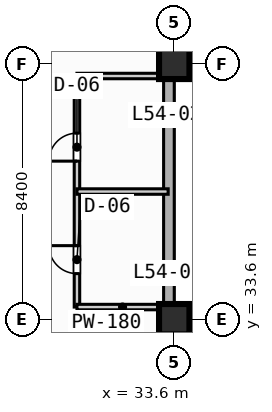
"""IFC4 building model, lengths in metres.
Left out: names, types, materials, properties, quantities, classifications, styles, units other than length and angle.
Written with IfcOpenShell. Run it as: python <this file> out.ifc"""

import sys

from ifc_helpers import new_model, si_unit, direction, frame, frame_2d, origin, origin_2d, place, context, subcontext, project, spatial, rectangle, extrude, element, fill, save


model = new_model("IFC4")
c1 = context("Model", 3, precision=1e-05, world=origin(), true_north=direction((0.0, 1.0)))
c2 = subcontext(c1, "Body", "Model", "MODEL_VIEW")
j1 = project(units=[si_unit("LENGTHUNIT", "METRE"), si_unit("PLANEANGLEUNIT", "RADIAN")], contexts=[c1])
p1 = place(None, origin())
s1 = spatial("IfcSite", under=j1, at=p1, CompositionType="ELEMENT")
p2 = place(p1, origin())
s2 = spatial("IfcBuilding", under=s1, at=p2, CompositionType="ELEMENT")
p3 = place(p2, frame((0.0, 0.0, 219.8)))
s3 = spatial("IfcBuildingStorey", under=s2, at=p3, CompositionType="ELEMENT", Elevation=219.8)
for number, where, z_axis, x_axis in (
    (1, (33.6, 33.6, 0.0), (0.0, 0.0, 1.0), (1.0, 0.0, 0.0)),
    (2, (33.6, 42.0, 0.0), (0.0, 0.0, 1.0), (1.0, 0.0, 0.0)),
):
    element("IfcColumn", number, at=place(p3, frame(where, z_axis=z_axis, x_axis=x_axis)), inside=s3, PredefinedType="COLUMN", context=c2, shape_type="SweptSolid", body=[
        extrude(rectangle(XDim=1.0, YDim=1.0, at=origin_2d()), origin(), (0.0, 0.0, 1.0), 4.2),
    ])
p4 = place(p3, frame((33.425, 72.425, 0.0), z_axis=(0.0, 0.0, 1.0), x_axis=(0.0, -1.0, 0.0)))
e3 = element("IfcWall", 3, at=p4, inside=s3, PredefinedType="STANDARD", context=c2, shape_type="SweptSolid", body=[
    extrude(rectangle(XDim=39.0, YDim=0.35, at=frame_2d((19.5, 0.0))), origin(), (0.0, 0.0, 1.0), 3.97),
])
p5 = place(p3, frame((33.425, 33.425, 0.0), z_axis=(0.0, 0.0, 1.0), x_axis=(1.0, 0.0, 0.0)))
e4 = element("IfcWall", 4, at=p5, inside=s3, PredefinedType="STANDARD", context=c2, shape_type="SweptSolid", body=[
    extrude(rectangle(XDim=39.0, YDim=0.35, at=frame_2d((19.5, 0.0))), origin(), (0.0, 0.0, 1.0), 3.97),
])
p6 = place(p5, frame((12.075, 0.0, 0.0)))
e5 = element("IfcOpeningElement", 5, at=p6, cuts=e4, PredefinedType="OPENING", context=c2, shape_type="SweptSolid", body=[
    extrude(rectangle(XDim=1.4, YDim=2.2, at=frame_2d((0.7, 1.1))), frame((0.0, 0.185, 0.0), z_axis=(0.0, -1.0, 0.0), x_axis=(1.0, 0.0, 0.0)), (0.0, 0.0, 1.0), 0.37),
])
p7 = place(p3, frame((30.4, 34.0, 0.0), z_axis=(0.0, 0.0, 1.0), x_axis=(0.0, 1.0, 0.0)))
e6 = element("IfcWall", 6, at=p7, inside=s3, PredefinedType="PLUMBINGWALL", context=c2, shape_type="SweptSolid", body=[
    extrude(rectangle(XDim=7.6, YDim=0.18, at=frame_2d((3.8, 0.0))), origin(), (0.0, 0.0, 1.0), 3.97),
])
p8 = place(p7, frame((1.1, 0.0, 0.0)))
e7 = element("IfcOpeningElement", 7, at=p8, cuts=e6, PredefinedType="OPENING", context=c2, shape_type="SweptSolid", body=[
    extrude(rectangle(XDim=0.92, YDim=2.1, at=frame_2d((0.46, 1.05))), frame((0.0, 0.1, 0.0), z_axis=(0.0, -1.0, 0.0), x_axis=(1.0, 0.0, 0.0)), (0.0, 0.0, 1.0), 0.2),
])
p9 = place(p7, frame((4.8, 0.0, 0.0)))
e8 = element("IfcOpeningElement", 8, at=p9, cuts=e6, PredefinedType="OPENING", context=c2, shape_type="SweptSolid", body=[
    extrude(rectangle(XDim=0.92, YDim=2.1, at=frame_2d((0.46, 1.05))), frame((0.0, 0.1, 0.0), z_axis=(0.0, -1.0, 0.0), x_axis=(1.0, 0.0, 0.0)), (0.0, 0.0, 1.0), 0.2),
])
for number, where, z_axis, x_axis in (
    (9, (30.4, 34.0, 0.0), (0.0, 0.0, 1.0), (1.0, 0.0, 0.0)),
    (10, (30.4, 37.8, 0.0), (0.0, 0.0, 1.0), (1.0, 0.0, 0.0)),
    (11, (30.4, 41.6, 0.0), (0.0, 0.0, 1.0), (1.0, 0.0, 0.0)),
):
    element("IfcWall", number, at=place(p3, frame(where, z_axis=z_axis, x_axis=x_axis)), inside=s3, PredefinedType="PLUMBINGWALL", context=c2, shape_type="SweptSolid", body=[
        extrude(rectangle(XDim=3.0, YDim=0.18, at=frame_2d((1.5, 0.0))), origin(), (0.0, 0.0, 1.0), 3.97),
    ])
p10 = place(p8, origin())
e12 = element("IfcDoor", 12, at=p10, inside=s3, OperationType="SINGLE_SWING_RIGHT", PredefinedType="DOOR", context=c2, shape_type="SweptSolid", body=[
    extrude(rectangle(XDim=0.92, YDim=2.1, at=frame_2d((0.46, 1.05))), frame((0.0, 0.025, 0.0), z_axis=(0.0, -1.0, 0.0), x_axis=(1.0, 0.0, 0.0)), (0.0, 0.0, 1.0), 0.05),
])
fill(e7, e12)
p11 = place(p9, origin())
e13 = element("IfcDoor", 13, at=p11, inside=s3, OperationType="SINGLE_SWING_LEFT", PredefinedType="DOOR", context=c2, shape_type="SweptSolid", body=[
    extrude(rectangle(XDim=0.92, YDim=2.1, at=frame_2d((0.46, 1.05))), frame((0.0, 0.025, 0.0), z_axis=(0.0, -1.0, 0.0), x_axis=(1.0, 0.0, 0.0)), (0.0, 0.0, 1.0), 0.05),
])
fill(e8, e13)
save(model, sys.argv[1])
